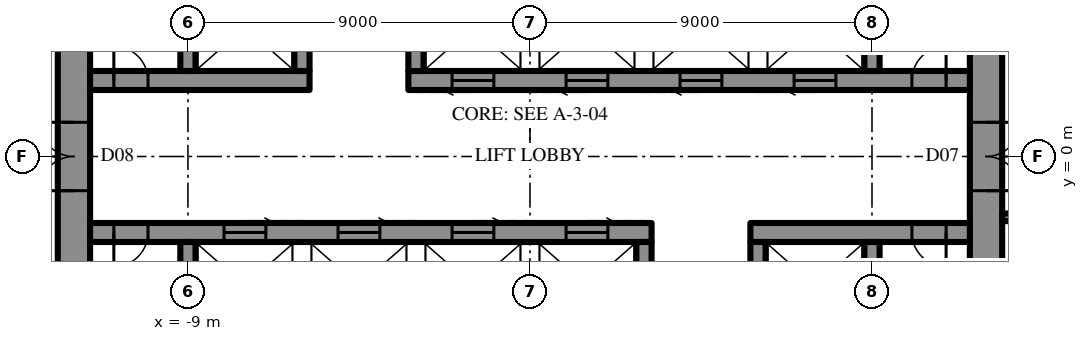
"""IFC4 building model, lengths in metres.
Left out: names, types, materials, properties, quantities, classifications, styles, units other than length and angle.
Written with IfcOpenShell. Run it as: python <this file> out.ifc"""

import sys

from ifc_helpers import new_model, si_unit, direction, frame, frame_2d, origin, place, context, subcontext, project, spatial, rectangle, extrude, element, fill, save


model = new_model("IFC4")
c1 = context("Model", 3, precision=1e-05, world=origin(), true_north=direction((0.0, 1.0)))
c2 = subcontext(c1, "Body", "Model", "MODEL_VIEW")
j1 = project(units=[si_unit("LENGTHUNIT", "METRE"), si_unit("PLANEANGLEUNIT", "RADIAN")], contexts=[c1])
p1 = place(None, origin())
s1 = spatial("IfcSite", under=j1, at=p1, CompositionType="ELEMENT")
p2 = place(p1, origin())
s2 = spatial("IfcBuilding", under=s1, at=p2, CompositionType="ELEMENT")
p3 = place(p2, frame((0.0, 0.0, 382.9)))
s3 = spatial("IfcBuildingStorey", under=s2, at=p3, CompositionType="ELEMENT", Elevation=382.9)
p4 = place(p3, frame((12.0, -10.7, 0.0), z_axis=(0.0, 0.0, 1.0), x_axis=(0.0, 1.0, 0.0)))
e1 = element("IfcWall", 1, at=p4, inside=s3, PredefinedType="SHEAR", context=c2, shape_type="SweptSolid", body=[
    extrude(rectangle(XDim=21.4, YDim=0.85, at=frame_2d((10.7, 0.0))), origin(), (0.0, 0.0, 1.0), 4.2),
])
p5 = place(p4, frame((9.8, 0.0, 0.0)))
e2 = element("IfcOpeningElement", 2, at=p5, cuts=e1, PredefinedType="OPENING", context=c2, shape_type="SweptSolid", body=[
    extrude(rectangle(XDim=1.8, YDim=2.4, at=frame_2d((0.9, 1.2))), frame((0.0, 0.435, 0.0), z_axis=(0.0, -1.0, 0.0), x_axis=(1.0, 0.0, 0.0)), (0.0, 0.0, 1.0), 0.87),
])
p6 = place(p3, frame((-12.0, 10.7, 0.0), z_axis=(0.0, 0.0, 1.0), x_axis=(0.0, -1.0, 0.0)))
e3 = element("IfcWall", 3, at=p6, inside=s3, PredefinedType="SHEAR", context=c2, shape_type="SweptSolid", body=[
    extrude(rectangle(XDim=21.4, YDim=0.85, at=frame_2d((10.7, 0.0))), origin(), (0.0, 0.0, 1.0), 4.2),
])
p7 = place(p6, frame((9.8, 0.0, 0.0)))
e4 = element("IfcOpeningElement", 4, at=p7, cuts=e3, PredefinedType="OPENING", context=c2, shape_type="SweptSolid", body=[
    extrude(rectangle(XDim=1.8, YDim=2.4, at=frame_2d((0.9, 1.2))), frame((0.0, 0.435, 0.0), z_axis=(0.0, -1.0, 0.0), x_axis=(1.0, 0.0, 0.0)), (0.0, 0.0, 1.0), 0.87),
])
p8 = place(p3, frame((-11.575, 2.0, 0.0), z_axis=(0.0, 0.0, 1.0), x_axis=(1.0, 0.0, 0.0)))
e5 = element("IfcWall", 5, at=p8, inside=s3, PredefinedType="SHEAR", context=c2, shape_type="SweptSolid", body=[
    extrude(rectangle(XDim=5.775, YDim=0.5, at=frame_2d((2.887, 0.0))), origin(), (0.0, 0.0, 1.0), 4.2),
])
p9 = place(p8, frame((0.625, 0.0, 0.0)))
e6 = element("IfcOpeningElement", 6, at=p9, cuts=e5, PredefinedType="OPENING", context=c2, shape_type="SweptSolid", body=[
    extrude(rectangle(XDim=0.9, YDim=2.2, at=frame_2d((0.45, 1.1))), frame((0.0, 0.26, 0.0), z_axis=(0.0, -1.0, 0.0), x_axis=(1.0, 0.0, 0.0)), (0.0, 0.0, 1.0), 0.52),
])
p10 = place(p3, frame((-3.2, 2.0, 0.0), z_axis=(0.0, 0.0, 1.0), x_axis=(1.0, 0.0, 0.0)))
e7 = element("IfcWall", 7, at=p10, inside=s3, PredefinedType="SHEAR", context=c2, shape_type="SweptSolid", body=[
    extrude(rectangle(XDim=14.775, YDim=0.5, at=frame_2d((7.387, 0.0))), origin(), (0.0, 0.0, 1.0), 4.2),
])
p11 = place(p10, frame((13.25, 0.0, 0.0)))
e8 = element("IfcOpeningElement", 8, at=p11, cuts=e7, PredefinedType="OPENING", context=c2, shape_type="SweptSolid", body=[
    extrude(rectangle(XDim=0.9, YDim=2.2, at=frame_2d((0.45, 1.1))), frame((0.0, 0.26, 0.0), z_axis=(0.0, -1.0, 0.0), x_axis=(1.0, 0.0, 0.0)), (0.0, 0.0, 1.0), 0.52),
])
p12 = place(p10, frame((1.15, 0.0, 0.0)))
e9 = element("IfcOpeningElement", 9, at=p12, cuts=e7, PredefinedType="OPENING", context=c2, shape_type="SweptSolid", body=[
    extrude(rectangle(XDim=1.1, YDim=2.2, at=frame_2d((0.55, 1.1))), frame((0.0, 0.26, 0.0), z_axis=(0.0, -1.0, 0.0), x_axis=(1.0, 0.0, 0.0)), (0.0, 0.0, 1.0), 0.52),
])
p13 = place(p10, frame((4.15, 0.0, 0.0)))
e10 = element("IfcOpeningElement", 10, at=p13, cuts=e7, PredefinedType="OPENING", context=c2, shape_type="SweptSolid", body=[
    extrude(rectangle(XDim=1.1, YDim=2.2, at=frame_2d((0.55, 1.1))), frame((0.0, 0.26, 0.0), z_axis=(0.0, -1.0, 0.0), x_axis=(1.0, 0.0, 0.0)), (0.0, 0.0, 1.0), 0.52),
])
p14 = place(p10, frame((7.15, 0.0, 0.0)))
e11 = element("IfcOpeningElement", 11, at=p14, cuts=e7, PredefinedType="OPENING", context=c2, shape_type="SweptSolid", body=[
    extrude(rectangle(XDim=1.1, YDim=2.2, at=frame_2d((0.55, 1.1))), frame((0.0, 0.26, 0.0), z_axis=(0.0, -1.0, 0.0), x_axis=(1.0, 0.0, 0.0)), (0.0, 0.0, 1.0), 0.52),
])
p15 = place(p10, frame((10.15, 0.0, 0.0)))
e12 = element("IfcOpeningElement", 12, at=p15, cuts=e7, PredefinedType="OPENING", context=c2, shape_type="SweptSolid", body=[
    extrude(rectangle(XDim=1.1, YDim=2.2, at=frame_2d((0.55, 1.1))), frame((0.0, 0.26, 0.0), z_axis=(0.0, -1.0, 0.0), x_axis=(1.0, 0.0, 0.0)), (0.0, 0.0, 1.0), 0.52),
])
for number, where, z_axis, x_axis in (
    (13, (-9.0, 2.25, 0.0), (0.0, 0.0, 1.0), (0.0, 1.0, 0.0)),
    (14, (-6.0, 2.25, 0.0), (0.0, 0.0, 1.0), (0.0, 1.0, 0.0)),
    (15, (-3.0, 2.25, 0.0), (0.0, 0.0, 1.0), (0.0, 1.0, 0.0)),
    (16, (9.0, 2.25, 0.0), (0.0, 0.0, 1.0), (0.0, 1.0, 0.0)),
):
    element("IfcWall", number, at=place(p3, frame(where, z_axis=z_axis, x_axis=x_axis)), inside=s3, PredefinedType="SHEAR", context=c2, shape_type="SweptSolid", body=[
        extrude(rectangle(XDim=2.3, YDim=0.4, at=frame_2d((1.15, 0.0))), origin(), (0.0, 0.0, 1.0), 4.2),
    ])
p16 = place(p3, frame((11.575, -2.0, 0.0), z_axis=(0.0, 0.0, 1.0), x_axis=(-1.0, 0.0, 0.0)))
e17 = element("IfcWall", 17, at=p16, inside=s3, PredefinedType="SHEAR", context=c2, shape_type="SweptSolid", body=[
    extrude(rectangle(XDim=5.775, YDim=0.5, at=frame_2d((2.887, 0.0))), origin(), (0.0, 0.0, 1.0), 4.2),
])
p17 = place(p16, frame((0.625, 0.0, 0.0)))
e18 = element("IfcOpeningElement", 18, at=p17, cuts=e17, PredefinedType="OPENING", context=c2, shape_type="SweptSolid", body=[
    extrude(rectangle(XDim=0.9, YDim=2.2, at=frame_2d((0.45, 1.1))), frame((0.0, 0.26, 0.0), z_axis=(0.0, -1.0, 0.0), x_axis=(1.0, 0.0, 0.0)), (0.0, 0.0, 1.0), 0.52),
])
p18 = place(p3, frame((3.2, -2.0, 0.0), z_axis=(0.0, 0.0, 1.0), x_axis=(-1.0, 0.0, 0.0)))
e19 = element("IfcWall", 19, at=p18, inside=s3, PredefinedType="SHEAR", context=c2, shape_type="SweptSolid", body=[
    extrude(rectangle(XDim=14.775, YDim=0.5, at=frame_2d((7.387, 0.0))), origin(), (0.0, 0.0, 1.0), 4.2),
])
p19 = place(p18, frame((13.25, 0.0, 0.0)))
e20 = element("IfcOpeningElement", 20, at=p19, cuts=e19, PredefinedType="OPENING", context=c2, shape_type="SweptSolid", body=[
    extrude(rectangle(XDim=0.9, YDim=2.2, at=frame_2d((0.45, 1.1))), frame((0.0, 0.26, 0.0), z_axis=(0.0, -1.0, 0.0), x_axis=(1.0, 0.0, 0.0)), (0.0, 0.0, 1.0), 0.52),
])
p20 = place(p18, frame((1.15, 0.0, 0.0)))
e21 = element("IfcOpeningElement", 21, at=p20, cuts=e19, PredefinedType="OPENING", context=c2, shape_type="SweptSolid", body=[
    extrude(rectangle(XDim=1.1, YDim=2.2, at=frame_2d((0.55, 1.1))), frame((0.0, 0.26, 0.0), z_axis=(0.0, -1.0, 0.0), x_axis=(1.0, 0.0, 0.0)), (0.0, 0.0, 1.0), 0.52),
])
p21 = place(p18, frame((4.15, 0.0, 0.0)))
e22 = element("IfcOpeningElement", 22, at=p21, cuts=e19, PredefinedType="OPENING", context=c2, shape_type="SweptSolid", body=[
    extrude(rectangle(XDim=1.1, YDim=2.2, at=frame_2d((0.55, 1.1))), frame((0.0, 0.26, 0.0), z_axis=(0.0, -1.0, 0.0), x_axis=(1.0, 0.0, 0.0)), (0.0, 0.0, 1.0), 0.52),
])
p22 = place(p18, frame((7.15, 0.0, 0.0)))
e23 = element("IfcOpeningElement", 23, at=p22, cuts=e19, PredefinedType="OPENING", context=c2, shape_type="SweptSolid", body=[
    extrude(rectangle(XDim=1.1, YDim=2.2, at=frame_2d((0.55, 1.1))), frame((0.0, 0.26, 0.0), z_axis=(0.0, -1.0, 0.0), x_axis=(1.0, 0.0, 0.0)), (0.0, 0.0, 1.0), 0.52),
])
p23 = place(p18, frame((10.15, 0.0, 0.0)))
e24 = element("IfcOpeningElement", 24, at=p23, cuts=e19, PredefinedType="OPENING", context=c2, shape_type="SweptSolid", body=[
    extrude(rectangle(XDim=1.1, YDim=2.2, at=frame_2d((0.55, 1.1))), frame((0.0, 0.26, 0.0), z_axis=(0.0, -1.0, 0.0), x_axis=(1.0, 0.0, 0.0)), (0.0, 0.0, 1.0), 0.52),
])
for number, where, z_axis, x_axis in (
    (25, (9.0, -2.25, 0.0), (0.0, 0.0, 1.0), (0.0, -1.0, 0.0)),
    (26, (6.0, -2.25, 0.0), (0.0, 0.0, 1.0), (0.0, -1.0, 0.0)),
    (27, (3.0, -2.25, 0.0), (0.0, 0.0, 1.0), (0.0, -1.0, 0.0)),
    (28, (-9.0, -2.25, 0.0), (0.0, 0.0, 1.0), (0.0, -1.0, 0.0)),
):
    element("IfcWall", number, at=place(p3, frame(where, z_axis=z_axis, x_axis=x_axis)), inside=s3, PredefinedType="SHEAR", context=c2, shape_type="SweptSolid", body=[
        extrude(rectangle(XDim=2.3, YDim=0.4, at=frame_2d((1.15, 0.0))), origin(), (0.0, 0.0, 1.0), 4.2),
    ])
p24 = place(p3, frame((12.425, -1.6, 0.0), z_axis=(0.0, 0.0, 1.0), x_axis=(1.0, 0.0, 0.0)))
e29 = element("IfcWall", 29, at=p24, inside=s3, PredefinedType="PARTITIONING", context=c2, shape_type="SweptSolid", body=[
    extrude(rectangle(XDim=16.558, YDim=0.2, at=frame_2d((8.279, 0.0))), origin(), (0.0, 0.0, 1.0), 4.0),
])
p25 = place(p24, frame((1.156, 0.0, 0.0)))
e30 = element("IfcOpeningElement", 30, at=p25, cuts=e29, PredefinedType="OPENING", context=c2, shape_type="SweptSolid", body=[
    extrude(rectangle(XDim=1.0, YDim=2.2, at=frame_2d((0.5, 1.1))), frame((0.0, 0.11, 0.0), z_axis=(0.0, -1.0, 0.0), x_axis=(1.0, 0.0, 0.0)), (0.0, 0.0, 1.0), 0.22),
])
p26 = place(p5, frame((1.8, 0.0, 0.0), z_axis=(0.0, 0.0, 1.0), x_axis=(-1.0, 0.0, 0.0)))
e31 = element("IfcDoor", 31, at=p26, inside=s3, OperationType="DOUBLE_DOOR_SINGLE_SWING", PredefinedType="DOOR", context=c2, shape_type="SweptSolid", body=[
    extrude(rectangle(XDim=1.8, YDim=2.4, at=frame_2d((0.9, 1.2))), frame((0.0, 0.025, 0.0), z_axis=(0.0, -1.0, 0.0), x_axis=(1.0, 0.0, 0.0)), (0.0, 0.0, 1.0), 0.05),
])
fill(e2, e31)
p27 = place(p7, frame((1.8, 0.0, 0.0), z_axis=(0.0, 0.0, 1.0), x_axis=(-1.0, 0.0, 0.0)))
e32 = element("IfcDoor", 32, at=p27, inside=s3, OperationType="DOUBLE_DOOR_SINGLE_SWING", PredefinedType="DOOR", context=c2, shape_type="SweptSolid", body=[
    extrude(rectangle(XDim=1.8, YDim=2.4, at=frame_2d((0.9, 1.2))), frame((0.0, 0.025, 0.0), z_axis=(0.0, -1.0, 0.0), x_axis=(1.0, 0.0, 0.0)), (0.0, 0.0, 1.0), 0.05),
])
fill(e4, e32)
p28 = place(p9, origin())
e33 = element("IfcDoor", 33, at=p28, inside=s3, OperationType="SINGLE_SWING_RIGHT", PredefinedType="DOOR", context=c2, shape_type="SweptSolid", body=[
    extrude(rectangle(XDim=0.9, YDim=2.2, at=frame_2d((0.45, 1.1))), frame((0.0, 0.025, 0.0), z_axis=(0.0, -1.0, 0.0), x_axis=(1.0, 0.0, 0.0)), (0.0, 0.0, 1.0), 0.05),
])
fill(e6, e33)
p29 = place(p11, origin())
e34 = element("IfcDoor", 34, at=p29, inside=s3, OperationType="SINGLE_SWING_LEFT", PredefinedType="DOOR", context=c2, shape_type="SweptSolid", body=[
    extrude(rectangle(XDim=0.9, YDim=2.2, at=frame_2d((0.45, 1.1))), frame((0.0, 0.025, 0.0), z_axis=(0.0, -1.0, 0.0), x_axis=(1.0, 0.0, 0.0)), (0.0, 0.0, 1.0), 0.05),
])
fill(e8, e34)
p30 = place(p17, origin())
e35 = element("IfcDoor", 35, at=p30, inside=s3, OperationType="SINGLE_SWING_RIGHT", PredefinedType="DOOR", context=c2, shape_type="SweptSolid", body=[
    extrude(rectangle(XDim=0.9, YDim=2.2, at=frame_2d((0.45, 1.1))), frame((0.0, 0.025, 0.0), z_axis=(0.0, -1.0, 0.0), x_axis=(1.0, 0.0, 0.0)), (0.0, 0.0, 1.0), 0.05),
])
fill(e18, e35)
p31 = place(p19, origin())
e36 = element("IfcDoor", 36, at=p31, inside=s3, OperationType="SINGLE_SWING_LEFT", PredefinedType="DOOR", context=c2, shape_type="SweptSolid", body=[
    extrude(rectangle(XDim=0.9, YDim=2.2, at=frame_2d((0.45, 1.1))), frame((0.0, 0.025, 0.0), z_axis=(0.0, -1.0, 0.0), x_axis=(1.0, 0.0, 0.0)), (0.0, 0.0, 1.0), 0.05),
])
fill(e20, e36)
p32 = place(p12, frame((1.1, 0.0, 0.0), z_axis=(0.0, 0.0, 1.0), x_axis=(-1.0, 0.0, 0.0)))
e37 = element("IfcDoor", 37, at=p32, inside=s3, OperationType="SLIDING_TO_LEFT", PredefinedType="DOOR", context=c2, shape_type="SweptSolid", body=[
    extrude(rectangle(XDim=1.1, YDim=2.2, at=frame_2d((0.55, 1.1))), frame((0.0, 0.025, 0.0), z_axis=(0.0, -1.0, 0.0), x_axis=(1.0, 0.0, 0.0)), (0.0, 0.0, 1.0), 0.05),
])
fill(e9, e37)
p33 = place(p13, frame((1.1, 0.0, 0.0), z_axis=(0.0, 0.0, 1.0), x_axis=(-1.0, 0.0, 0.0)))
e38 = element("IfcDoor", 38, at=p33, inside=s3, OperationType="SLIDING_TO_LEFT", PredefinedType="DOOR", context=c2, shape_type="SweptSolid", body=[
    extrude(rectangle(XDim=1.1, YDim=2.2, at=frame_2d((0.55, 1.1))), frame((0.0, 0.025, 0.0), z_axis=(0.0, -1.0, 0.0), x_axis=(1.0, 0.0, 0.0)), (0.0, 0.0, 1.0), 0.05),
])
fill(e10, e38)
p34 = place(p14, frame((1.1, 0.0, 0.0), z_axis=(0.0, 0.0, 1.0), x_axis=(-1.0, 0.0, 0.0)))
e39 = element("IfcDoor", 39, at=p34, inside=s3, OperationType="SLIDING_TO_LEFT", PredefinedType="DOOR", context=c2, shape_type="SweptSolid", body=[
    extrude(rectangle(XDim=1.1, YDim=2.2, at=frame_2d((0.55, 1.1))), frame((0.0, 0.025, 0.0), z_axis=(0.0, -1.0, 0.0), x_axis=(1.0, 0.0, 0.0)), (0.0, 0.0, 1.0), 0.05),
])
fill(e11, e39)
p35 = place(p15, frame((1.1, 0.0, 0.0), z_axis=(0.0, 0.0, 1.0), x_axis=(-1.0, 0.0, 0.0)))
e40 = element("IfcDoor", 40, at=p35, inside=s3, OperationType="SLIDING_TO_LEFT", PredefinedType="DOOR", context=c2, shape_type="SweptSolid", body=[
    extrude(rectangle(XDim=1.1, YDim=2.2, at=frame_2d((0.55, 1.1))), frame((0.0, 0.025, 0.0), z_axis=(0.0, -1.0, 0.0), x_axis=(1.0, 0.0, 0.0)), (0.0, 0.0, 1.0), 0.05),
])
fill(e12, e40)
p36 = place(p20, frame((1.1, 0.0, 0.0), z_axis=(0.0, 0.0, 1.0), x_axis=(-1.0, 0.0, 0.0)))
e41 = element("IfcDoor", 41, at=p36, inside=s3, OperationType="SLIDING_TO_LEFT", PredefinedType="DOOR", context=c2, shape_type="SweptSolid", body=[
    extrude(rectangle(XDim=1.1, YDim=2.2, at=frame_2d((0.55, 1.1))), frame((0.0, 0.025, 0.0), z_axis=(0.0, -1.0, 0.0), x_axis=(1.0, 0.0, 0.0)), (0.0, 0.0, 1.0), 0.05),
])
fill(e21, e41)
p37 = place(p21, frame((1.1, 0.0, 0.0), z_axis=(0.0, 0.0, 1.0), x_axis=(-1.0, 0.0, 0.0)))
e42 = element("IfcDoor", 42, at=p37, inside=s3, OperationType="SLIDING_TO_LEFT", PredefinedType="DOOR", context=c2, shape_type="SweptSolid", body=[
    extrude(rectangle(XDim=1.1, YDim=2.2, at=frame_2d((0.55, 1.1))), frame((0.0, 0.025, 0.0), z_axis=(0.0, -1.0, 0.0), x_axis=(1.0, 0.0, 0.0)), (0.0, 0.0, 1.0), 0.05),
])
fill(e22, e42)
p38 = place(p22, frame((1.1, 0.0, 0.0), z_axis=(0.0, 0.0, 1.0), x_axis=(-1.0, 0.0, 0.0)))
e43 = element("IfcDoor", 43, at=p38, inside=s3, OperationType="SLIDING_TO_LEFT", PredefinedType="DOOR", context=c2, shape_type="SweptSolid", body=[
    extrude(rectangle(XDim=1.1, YDim=2.2, at=frame_2d((0.55, 1.1))), frame((0.0, 0.025, 0.0), z_axis=(0.0, -1.0, 0.0), x_axis=(1.0, 0.0, 0.0)), (0.0, 0.0, 1.0), 0.05),
])
fill(e23, e43)
p39 = place(p23, frame((1.1, 0.0, 0.0), z_axis=(0.0, 0.0, 1.0), x_axis=(-1.0, 0.0, 0.0)))
e44 = element("IfcDoor", 44, at=p39, inside=s3, OperationType="SLIDING_TO_LEFT", PredefinedType="DOOR", context=c2, shape_type="SweptSolid", body=[
    extrude(rectangle(XDim=1.1, YDim=2.2, at=frame_2d((0.55, 1.1))), frame((0.0, 0.025, 0.0), z_axis=(0.0, -1.0, 0.0), x_axis=(1.0, 0.0, 0.0)), (0.0, 0.0, 1.0), 0.05),
])
fill(e24, e44)
save(model, sys.argv[1])
